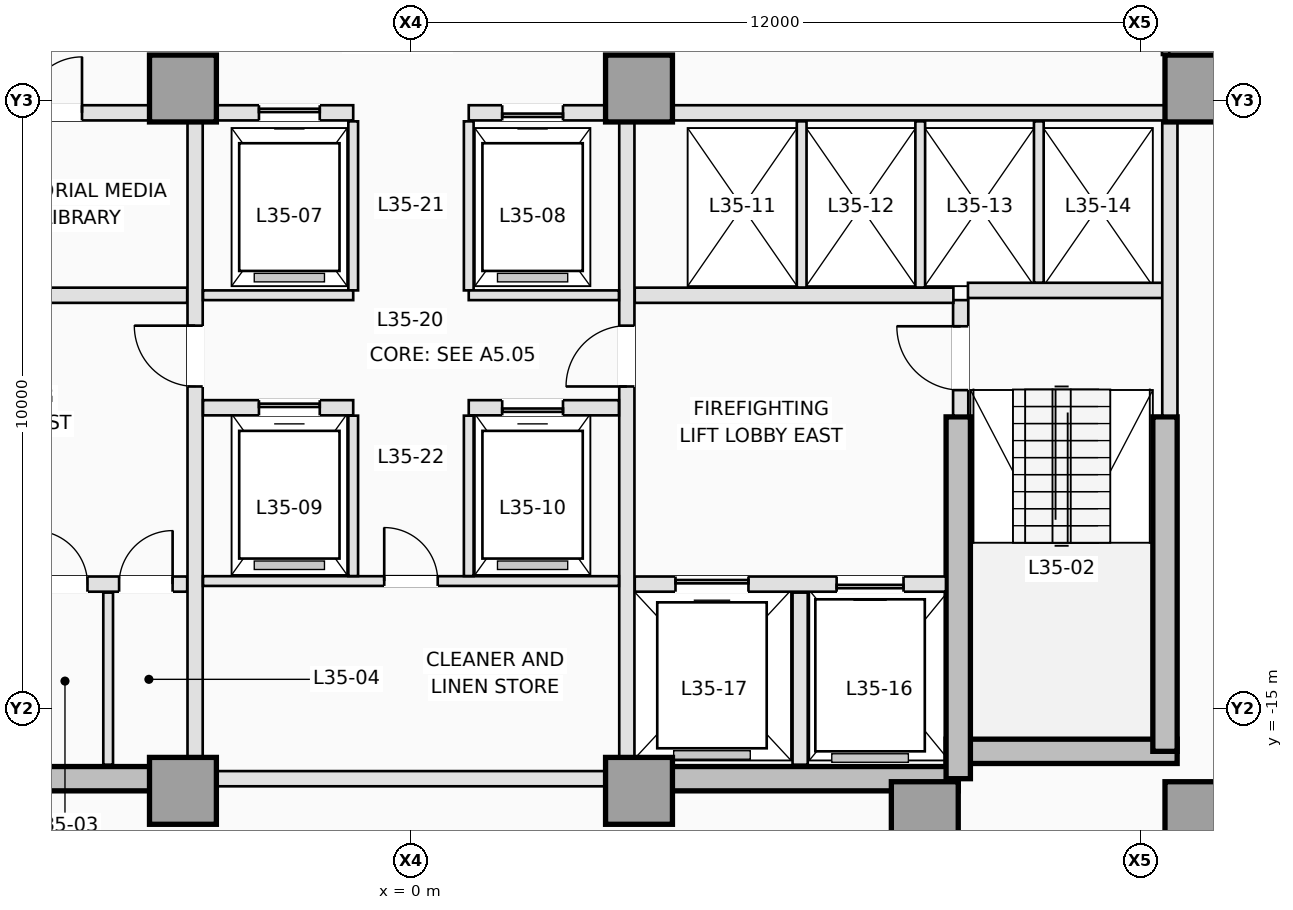
"""IFC4 building model, lengths in metres.
Left out: names, types, materials, properties, quantities, classifications, styles, units other than length and angle.
Written with IfcOpenShell. Run it as: python <this file> out.ifc"""

import sys

from ifc_helpers import new_model, si_unit, direction, frame, frame_2d, origin, origin_2d, place, context, subcontext, project, spatial, rectangle, extrude, element, fill, save


model = new_model("IFC4")
c1 = context("Model", 3, precision=1e-05, world=origin(), true_north=direction((0.0, 1.0)))
c2 = subcontext(c1, "Body", "Model", "MODEL_VIEW")
j1 = project(units=[si_unit("LENGTHUNIT", "METRE"), si_unit("PLANEANGLEUNIT", "RADIAN")], contexts=[c1])
p1 = place(None, origin())
s1 = spatial("IfcSite", under=j1, at=p1, CompositionType="ELEMENT")
p2 = place(p1, origin())
s2 = spatial("IfcBuilding", under=s1, at=p2, CompositionType="ELEMENT")
p3 = place(p2, frame((0.0, 0.0, 130.0)))
s3 = spatial("IfcBuildingStorey", under=s2, at=p3, CompositionType="ELEMENT", Elevation=130.0)
for number, where, z_axis, x_axis in (
    (1, (-9.0, -16.15, 0.0), (0.0, 0.0, 1.0), (1.0, 0.0, 0.0)),
    (2, (3.75, -16.15, 0.0), (0.0, 0.0, 1.0), (1.0, 0.0, 0.0)),
):
    element("IfcWall", number, at=place(p3, frame(where, z_axis=z_axis, x_axis=x_axis)), inside=s3, PredefinedType="SHEAR", context=c2, shape_type="SweptSolid", body=[
        extrude(rectangle(XDim=5.25, YDim=0.4, at=frame_2d((2.625, 0.0))), origin(), (0.0, 0.0, 1.0), 3.5),
    ])
p4 = place(p3, frame((8.8, -15.7, 0.0), z_axis=(0.0, 0.0, 1.0), x_axis=(1.0, 0.0, 0.0)))
e3 = element("IfcWall", 3, at=p4, inside=s3, PredefinedType="SHEAR", context=c2, shape_type="SweptSolid", body=[
    extrude(rectangle(XDim=3.8, YDim=0.4, at=frame_2d((1.9, 0.0))), origin(), (0.0, 0.0, 1.0), 3.5),
])
p5 = place(p3, frame((12.4, -15.7, 0.0), z_axis=(0.0, 0.0, 1.0), x_axis=(0.0, 1.0, 0.0)))
e4 = element("IfcWall", 4, at=p5, inside=s3, PredefinedType="SHEAR", context=c2, shape_type="SweptSolid", body=[
    extrude(rectangle(XDim=5.5, YDim=0.4, at=frame_2d((2.75, 0.0))), origin(), (0.0, 0.0, 1.0), 3.5),
])
p6 = place(p3, frame((9.0, -16.15, 0.0), z_axis=(0.0, 0.0, 1.0), x_axis=(0.0, 1.0, 0.0)))
e5 = element("IfcWall", 5, at=p6, inside=s3, PredefinedType="SHEAR", context=c2, shape_type="SweptSolid", body=[
    extrude(rectangle(XDim=5.95, YDim=0.4, at=frame_2d((2.975, 0.0))), origin(), (0.0, 0.0, 1.0), 3.5),
])
for number, where, z_axis, x_axis in (
    (6, (-3.75, -16.35, 0.0), (0.0, 0.0, 1.0), (1.0, 0.0, 0.0)),
    (7, (3.75, -16.35, 0.0), (0.0, 0.0, 1.0), (1.0, 0.0, 0.0)),
    (8, (8.45, -16.75, 0.0), (0.0, 0.0, 1.0), (1.0, 0.0, 0.0)),
    (9, (12.95, -16.75, 0.0), (0.0, 0.0, 1.0), (1.0, 0.0, 0.0)),
    (10, (-3.75, -4.8, 0.0), (0.0, 0.0, 1.0), (1.0, 0.0, 0.0)),
    (11, (3.75, -4.8, 0.0), (0.0, 0.0, 1.0), (1.0, 0.0, 0.0)),
    (12, (12.95, -4.8, 0.0), (0.0, 0.0, 1.0), (1.0, 0.0, 0.0)),
):
    element("IfcColumn", number, at=place(p3, frame(where, z_axis=z_axis, x_axis=x_axis)), inside=s3, PredefinedType="COLUMN", context=c2, shape_type="SweptSolid", body=[
        extrude(rectangle(XDim=1.1, YDim=1.1, at=origin_2d()), origin(), (0.0, 0.0, 1.0), 3.5),
    ])
p7 = place(p3, frame((9.04, -10.18, 0.0), z_axis=(0.0, 0.0, 1.0), x_axis=(0.0, 1.0, 0.0)))
e13 = element("IfcWall", 13, at=p7, inside=s3, PredefinedType="PARTITIONING", context=c2, shape_type="SweptSolid", body=[
    extrude(rectangle(XDim=1.9, YDim=0.25, at=frame_2d((0.95, 0.0))), origin(), (0.0, 0.0, 1.0), 3.25),
])
p8 = place(p7, frame((0.42, 0.0, 0.0)))
e14 = element("IfcOpeningElement", 14, at=p8, cuts=e13, PredefinedType="OPENING", context=c2, shape_type="SweptSolid", body=[
    extrude(rectangle(XDim=1.05, YDim=2.15, at=frame_2d((0.525, 1.075))), frame((0.0, 0.135, 0.0), z_axis=(0.0, -1.0, 0.0), x_axis=(1.0, 0.0, 0.0)), (0.0, 0.0, 1.0), 0.27),
])
p9 = place(p3, frame((9.16, -8.12, 0.0), z_axis=(0.0, 0.0, 1.0), x_axis=(1.0, 0.0, 0.0)))
e15 = element("IfcWall", 15, at=p9, inside=s3, PredefinedType="PARTITIONING", context=c2, shape_type="SweptSolid", body=[
    extrude(rectangle(XDim=3.22, YDim=0.25, at=frame_2d((1.61, 0.0))), origin(), (0.0, 0.0, 1.0), 3.25),
])
p10 = place(p3, frame((12.48, -10.18, 0.0), z_axis=(0.0, 0.0, 1.0), x_axis=(0.0, 1.0, 0.0)))
e16 = element("IfcWall", 16, at=p10, inside=s3, PredefinedType="PARTITIONING", context=c2, shape_type="SweptSolid", body=[
    extrude(rectangle(XDim=4.828, YDim=0.25, at=frame_2d((2.414, 0.0))), origin(), (0.0, 0.0, 1.0), 3.25),
])
p11 = place(p3, frame((-8.798, -12.95, 0.0), z_axis=(0.0, 0.0, 1.0), x_axis=(1.0, 0.0, 0.0)))
e17 = element("IfcWall", 17, at=p11, inside=s3, PredefinedType="PARTITIONING", context=c2, shape_type="SweptSolid", body=[
    extrude(rectangle(XDim=5.118, YDim=0.25, at=frame_2d((2.559, 0.0))), origin(), (0.0, 0.0, 1.0), 3.25),
])
p12 = place(p11, frame((0.698, 0.0, 0.0)))
e18 = element("IfcOpeningElement", 18, at=p12, cuts=e17, PredefinedType="OPENING", context=c2, shape_type="SweptSolid", body=[
    extrude(rectangle(XDim=1.1, YDim=2.15, at=frame_2d((0.55, 1.075))), frame((0.0, 0.135, 0.0), z_axis=(0.0, -1.0, 0.0), x_axis=(1.0, 0.0, 0.0)), (0.0, 0.0, 1.0), 0.27),
])
p13 = place(p11, frame((2.598, 0.0, 0.0)))
e19 = element("IfcOpeningElement", 19, at=p13, cuts=e17, PredefinedType="OPENING", context=c2, shape_type="SweptSolid", body=[
    extrude(rectangle(XDim=0.88, YDim=2.1, at=frame_2d((0.44, 1.05))), frame((0.0, 0.135, 0.0), z_axis=(0.0, -1.0, 0.0), x_axis=(1.0, 0.0, 0.0)), (0.0, 0.0, 1.0), 0.27),
])
p14 = place(p11, frame((3.998, 0.0, 0.0)))
e20 = element("IfcOpeningElement", 20, at=p14, cuts=e17, PredefinedType="OPENING", context=c2, shape_type="SweptSolid", body=[
    extrude(rectangle(XDim=0.88, YDim=2.1, at=frame_2d((0.44, 1.05))), frame((0.0, 0.135, 0.0), z_axis=(0.0, -1.0, 0.0), x_axis=(1.0, 0.0, 0.0)), (0.0, 0.0, 1.0), 0.27),
])
p15 = place(p3, frame((3.68, -12.95, 0.0), z_axis=(0.0, 0.0, 1.0), x_axis=(1.0, 0.0, 0.0)))
e21 = element("IfcWall", 21, at=p15, inside=s3, PredefinedType="PARTITIONING", context=c2, shape_type="SweptSolid", body=[
    extrude(rectangle(XDim=5.118, YDim=0.25, at=frame_2d((2.559, 0.0))), origin(), (0.0, 0.0, 1.0), 3.25),
])
p16 = place(p15, frame((3.32, 0.0, 0.0)))
e22 = element("IfcOpeningElement", 22, at=p16, cuts=e21, PredefinedType="OPENING", context=c2, shape_type="SweptSolid", body=[
    extrude(rectangle(XDim=1.1, YDim=2.15, at=frame_2d((0.55, 1.075))), frame((0.0, 0.135, 0.0), z_axis=(0.0, -1.0, 0.0), x_axis=(1.0, 0.0, 0.0)), (0.0, 0.0, 1.0), 0.27),
])
p17 = place(p15, frame((0.67, 0.0, 0.0)))
e23 = element("IfcOpeningElement", 23, at=p17, cuts=e21, PredefinedType="OPENING", context=c2, shape_type="SweptSolid", body=[
    extrude(rectangle(XDim=1.2, YDim=2.15, at=frame_2d((0.6, 1.075))), frame((0.0, 0.135, 0.0), z_axis=(0.0, -1.0, 0.0), x_axis=(1.0, 0.0, 0.0)), (0.0, 0.0, 1.0), 0.27),
])
p18 = place(p3, frame((-4.98, -15.92, 0.0), z_axis=(0.0, 0.0, 1.0), x_axis=(0.0, 1.0, 0.0)))
e24 = element("IfcWall", 24, at=p18, inside=s3, PredefinedType="PARTITIONING", context=c2, shape_type="SweptSolid", body=[
    extrude(rectangle(XDim=2.83, YDim=0.16, at=frame_2d((1.415, 0.0))), origin(), (0.0, 0.0, 1.0), 3.25),
])
p19 = place(p3, frame((6.4, -15.92, 0.0), z_axis=(0.0, 0.0, 1.0), x_axis=(0.0, 1.0, 0.0)))
e25 = element("IfcWall", 25, at=p19, inside=s3, PredefinedType="PARTITIONING", context=c2, shape_type="SweptSolid", body=[
    extrude(rectangle(XDim=2.83, YDim=0.25, at=frame_2d((1.415, 0.0))), origin(), (0.0, 0.0, 1.0), 3.25),
])
for number, where, z_axis, x_axis in (
    (26, (-8.92, -8.2, 0.0), (0.0, 0.0, 1.0), (1.0, 0.0, 0.0)),
    (27, (3.68, -8.2, 0.0), (0.0, 0.0, 1.0), (1.0, 0.0, 0.0)),
):
    element("IfcWall", number, at=place(p3, frame(where, z_axis=z_axis, x_axis=x_axis)), inside=s3, PredefinedType="PARTITIONING", context=c2, shape_type="SweptSolid", body=[
        extrude(rectangle(XDim=5.24, YDim=0.25, at=frame_2d((2.62, 0.0))), origin(), (0.0, 0.0, 1.0), 3.25),
    ])
p20 = place(p3, frame((-3.55, -15.798, 0.0), z_axis=(0.0, 0.0, 1.0), x_axis=(0.0, 1.0, 0.0)))
e28 = element("IfcWall", 28, at=p20, inside=s3, PredefinedType="PARTITIONING", context=c2, shape_type="SweptSolid", body=[
    extrude(rectangle(XDim=10.446, YDim=0.25, at=frame_2d((5.223, 0.0))), origin(), (0.0, 0.0, 1.0), 3.25),
])
p21 = place(p20, frame((6.098, 0.0, 0.0)))
e29 = element("IfcOpeningElement", 29, at=p21, cuts=e28, PredefinedType="OPENING", context=c2, shape_type="SweptSolid", body=[
    extrude(rectangle(XDim=1.0, YDim=2.15, at=frame_2d((0.5, 1.075))), frame((0.0, 0.135, 0.0), z_axis=(0.0, -1.0, 0.0), x_axis=(1.0, 0.0, 0.0)), (0.0, 0.0, 1.0), 0.27),
])
p22 = place(p3, frame((3.55, -15.798, 0.0), z_axis=(0.0, 0.0, 1.0), x_axis=(0.0, 1.0, 0.0)))
e30 = element("IfcWall", 30, at=p22, inside=s3, PredefinedType="PARTITIONING", context=c2, shape_type="SweptSolid", body=[
    extrude(rectangle(XDim=10.446, YDim=0.25, at=frame_2d((5.223, 0.0))), origin(), (0.0, 0.0, 1.0), 3.25),
])
p23 = place(p22, frame((6.098, 0.0, 0.0)))
e31 = element("IfcOpeningElement", 31, at=p23, cuts=e30, PredefinedType="OPENING", context=c2, shape_type="SweptSolid", body=[
    extrude(rectangle(XDim=1.0, YDim=2.15, at=frame_2d((0.5, 1.075))), frame((0.0, 0.135, 0.0), z_axis=(0.0, -1.0, 0.0), x_axis=(1.0, 0.0, 0.0)), (0.0, 0.0, 1.0), 0.27),
])
p24 = place(p3, frame((-12.398, -5.2, 0.0), z_axis=(0.0, 0.0, 1.0), x_axis=(1.0, 0.0, 0.0)))
e32 = element("IfcWall", 32, at=p24, inside=s3, PredefinedType="PARTITIONING", context=c2, shape_type="SweptSolid", body=[
    extrude(rectangle(XDim=8.096, YDim=0.25, at=frame_2d((4.048, 0.0))), origin(), (0.0, 0.0, 1.0), 3.25),
])
p25 = place(p24, frame((2.968, 0.0, 0.0)))
e33 = element("IfcOpeningElement", 33, at=p25, cuts=e32, PredefinedType="OPENING", context=c2, shape_type="SweptSolid", body=[
    extrude(rectangle(XDim=0.92, YDim=2.12, at=frame_2d((0.46, 1.06))), frame((0.0, 0.135, 0.0), z_axis=(0.0, -1.0, 0.0), x_axis=(1.0, 0.0, 0.0)), (0.0, 0.0, 1.0), 0.27),
])
p26 = place(p24, frame((6.068, 0.0, 0.0)))
e34 = element("IfcOpeningElement", 34, at=p26, cuts=e32, PredefinedType="OPENING", context=c2, shape_type="SweptSolid", body=[
    extrude(rectangle(XDim=0.92, YDim=2.12, at=frame_2d((0.46, 1.06))), frame((0.0, 0.135, 0.0), z_axis=(0.0, -1.0, 0.0), x_axis=(1.0, 0.0, 0.0)), (0.0, 0.0, 1.0), 0.27),
])
p27 = place(p3, frame((4.302, -5.2, 0.0), z_axis=(0.0, 0.0, 1.0), x_axis=(1.0, 0.0, 0.0)))
e35 = element("IfcWall", 35, at=p27, inside=s3, PredefinedType="PARTITIONING", context=c2, shape_type="SweptSolid", body=[
    extrude(rectangle(XDim=8.096, YDim=0.25, at=frame_2d((4.048, 0.0))), origin(), (0.0, 0.0, 1.0), 3.25),
])
p28 = place(p3, frame((-3.198, -5.2, 0.0), z_axis=(0.0, 0.0, 1.0), x_axis=(1.0, 0.0, 0.0)))
e36 = element("IfcWall", 36, at=p28, inside=s3, PredefinedType="PARTITIONING", context=c2, shape_type="SweptSolid", body=[
    extrude(rectangle(XDim=2.248, YDim=0.25, at=frame_2d((1.124, 0.0))), origin(), (0.0, 0.0, 1.0), 3.25),
])
p29 = place(p28, frame((0.698, 0.0, 0.0)))
e37 = element("IfcOpeningElement", 37, at=p29, cuts=e36, PredefinedType="OPENING", context=c2, shape_type="SweptSolid", body=[
    extrude(rectangle(XDim=1.0, YDim=2.15, at=frame_2d((0.5, 1.075))), frame((0.0, 0.135, 0.0), z_axis=(0.0, -1.0, 0.0), x_axis=(1.0, 0.0, 0.0)), (0.0, 0.0, 1.0), 0.27),
])
p30 = place(p3, frame((0.95, -5.2, 0.0), z_axis=(0.0, 0.0, 1.0), x_axis=(1.0, 0.0, 0.0)))
e38 = element("IfcWall", 38, at=p30, inside=s3, PredefinedType="PARTITIONING", context=c2, shape_type="SweptSolid", body=[
    extrude(rectangle(XDim=2.248, YDim=0.25, at=frame_2d((1.124, 0.0))), origin(), (0.0, 0.0, 1.0), 3.25),
])
p31 = place(p30, frame((0.55, 0.0, 0.0)))
e39 = element("IfcOpeningElement", 39, at=p31, cuts=e38, PredefinedType="OPENING", context=c2, shape_type="SweptSolid", body=[
    extrude(rectangle(XDim=1.0, YDim=2.15, at=frame_2d((0.5, 1.075))), frame((0.0, 0.135, 0.0), z_axis=(0.0, -1.0, 0.0), x_axis=(1.0, 0.0, 0.0)), (0.0, 0.0, 1.0), 0.27),
])
for number, where, z_axis, x_axis in (
    (40, (6.425, -8.073, 0.0), (0.0, 0.0, 1.0), (0.0, 1.0, 0.0)),
    (41, (8.375, -8.073, 0.0), (0.0, 0.0, 1.0), (0.0, 1.0, 0.0)),
):
    element("IfcWall", number, at=place(p3, frame(where, z_axis=z_axis, x_axis=x_axis)), inside=s3, PredefinedType="PARTITIONING", context=c2, shape_type="SweptSolid", body=[
        extrude(rectangle(XDim=2.733, YDim=0.16, at=frame_2d((1.366, 0.0))), origin(), (0.0, 0.0, 1.0), 3.25),
    ])
p32 = place(p3, frame((10.325, -7.993, 0.0), z_axis=(0.0, 0.0, 1.0), x_axis=(0.0, 1.0, 0.0)))
e42 = element("IfcWall", 42, at=p32, inside=s3, PredefinedType="PARTITIONING", context=c2, shape_type="SweptSolid", body=[
    extrude(rectangle(XDim=2.653, YDim=0.16, at=frame_2d((1.326, 0.0))), origin(), (0.0, 0.0, 1.0), 3.25),
])
p33 = place(p3, frame((-3.198, -16.15, 0.0), z_axis=(0.0, 0.0, 1.0), x_axis=(1.0, 0.0, 0.0)))
e43 = element("IfcWall", 43, at=p33, inside=s3, PredefinedType="PARTITIONING", context=c2, shape_type="SweptSolid", body=[
    extrude(rectangle(XDim=6.396, YDim=0.25, at=frame_2d((3.198, 0.0))), origin(), (0.0, 0.0, 1.0), 2.45),
])
for number, where, z_axis, x_axis in (
    (44, (-0.95, -8.12, 0.0), (0.0, 0.0, 1.0), (0.0, 1.0, 0.0)),
    (45, (0.95, -8.12, 0.0), (0.0, 0.0, 1.0), (0.0, 1.0, 0.0)),
):
    element("IfcWall", number, at=place(p3, frame(where, z_axis=z_axis, x_axis=x_axis)), inside=s3, PredefinedType="PARTITIONING", context=c2, shape_type="SweptSolid", body=[
        extrude(rectangle(XDim=2.78, YDim=0.16, at=frame_2d((1.39, 0.0))), origin(), (0.0, 0.0, 1.0), 3.25),
    ])
for number, where, z_axis, x_axis in (
    (46, (-3.42, -8.2, 0.0), (0.0, 0.0, 1.0), (1.0, 0.0, 0.0)),
    (47, (0.95, -8.2, 0.0), (0.0, 0.0, 1.0), (1.0, 0.0, 0.0)),
):
    element("IfcWall", number, at=place(p3, frame(where, z_axis=z_axis, x_axis=x_axis)), inside=s3, PredefinedType="PARTITIONING", context=c2, shape_type="SweptSolid", body=[
        extrude(rectangle(XDim=2.47, YDim=0.16, at=frame_2d((1.235, 0.0))), origin(), (0.0, 0.0, 1.0), 3.25),
    ])
p34 = place(p3, frame((-3.42, -10.05, 0.0), z_axis=(0.0, 0.0, 1.0), x_axis=(1.0, 0.0, 0.0)))
e48 = element("IfcWall", 48, at=p34, inside=s3, PredefinedType="PARTITIONING", context=c2, shape_type="SweptSolid", body=[
    extrude(rectangle(XDim=2.47, YDim=0.25, at=frame_2d((1.235, 0.0))), origin(), (0.0, 0.0, 1.0), 3.25),
])
p35 = place(p34, frame((0.92, 0.0, 0.0)))
e49 = element("IfcOpeningElement", 49, at=p35, cuts=e48, PredefinedType="OPENING", context=c2, shape_type="SweptSolid", body=[
    extrude(rectangle(XDim=1.0, YDim=2.15, at=frame_2d((0.5, 1.075))), frame((0.0, 0.135, 0.0), z_axis=(0.0, -1.0, 0.0), x_axis=(1.0, 0.0, 0.0)), (0.0, 0.0, 1.0), 0.27),
])
p36 = place(p3, frame((0.95, -10.05, 0.0), z_axis=(0.0, 0.0, 1.0), x_axis=(1.0, 0.0, 0.0)))
e50 = element("IfcWall", 50, at=p36, inside=s3, PredefinedType="PARTITIONING", context=c2, shape_type="SweptSolid", body=[
    extrude(rectangle(XDim=2.47, YDim=0.25, at=frame_2d((1.235, 0.0))), origin(), (0.0, 0.0, 1.0), 3.25),
])
p37 = place(p36, frame((0.55, 0.0, 0.0)))
e51 = element("IfcOpeningElement", 51, at=p37, cuts=e50, PredefinedType="OPENING", context=c2, shape_type="SweptSolid", body=[
    extrude(rectangle(XDim=1.0, YDim=2.15, at=frame_2d((0.5, 1.075))), frame((0.0, 0.135, 0.0), z_axis=(0.0, -1.0, 0.0), x_axis=(1.0, 0.0, 0.0)), (0.0, 0.0, 1.0), 0.27),
])
p38 = place(p3, frame((-3.42, -12.9, 0.0), z_axis=(0.0, 0.0, 1.0), x_axis=(1.0, 0.0, 0.0)))
e52 = element("IfcWall", 52, at=p38, inside=s3, PredefinedType="PARTITIONING", context=c2, shape_type="SweptSolid", body=[
    extrude(rectangle(XDim=6.84, YDim=0.16, at=frame_2d((3.42, 0.0))), origin(), (0.0, 0.0, 1.0), 3.25),
])
p39 = place(p38, frame((2.98, 0.0, 0.0)))
e53 = element("IfcOpeningElement", 53, at=p39, cuts=e52, PredefinedType="OPENING", context=c2, shape_type="SweptSolid", body=[
    extrude(rectangle(XDim=0.88, YDim=2.12, at=frame_2d((0.44, 1.06))), frame((0.0, 0.09, 0.0), z_axis=(0.0, -1.0, 0.0), x_axis=(1.0, 0.0, 0.0)), (0.0, 0.0, 1.0), 0.18),
])
for number, where, z_axis, x_axis in (
    (54, (-0.95, -12.818, 0.0), (0.0, 0.0, 1.0), (0.0, 1.0, 0.0)),
    (55, (0.95, -12.818, 0.0), (0.0, 0.0, 1.0), (0.0, 1.0, 0.0)),
):
    element("IfcWall", number, at=place(p3, frame(where, z_axis=z_axis, x_axis=x_axis)), inside=s3, PredefinedType="PARTITIONING", context=c2, shape_type="SweptSolid", body=[
        extrude(rectangle(XDim=2.638, YDim=0.16, at=frame_2d((1.319, 0.0))), origin(), (0.0, 0.0, 1.0), 3.25),
    ])
p40 = place(p3, frame((12.41, -2.462, 0.0), z_axis=(0.0, 0.0, 1.0), x_axis=(0.0, -1.0, 0.0)))
e56 = element("IfcWall", 56, at=p40, inside=s3, PredefinedType="PARTITIONING", context=c2, shape_type="SweptSolid", body=[
    extrude(rectangle(XDim=1.786, YDim=0.12, at=frame_2d((0.893, 0.0))), origin(), (0.0, 0.0, 1.0), 3.25),
])
p41 = place(p29, origin())
e57 = element("IfcDoor", 57, at=p41, inside=s3, OperationType="SLIDING_TO_LEFT", PredefinedType="DOOR", context=c2, shape_type="SweptSolid", body=[
    extrude(rectangle(XDim=1.0, YDim=2.15, at=frame_2d((0.5, 1.075))), frame((0.0, 0.025, 0.0), z_axis=(0.0, -1.0, 0.0), x_axis=(1.0, 0.0, 0.0)), (0.0, 0.0, 1.0), 0.05),
])
fill(e37, e57)
p42 = place(p31, origin())
e58 = element("IfcDoor", 58, at=p42, inside=s3, OperationType="SLIDING_TO_RIGHT", PredefinedType="DOOR", context=c2, shape_type="SweptSolid", body=[
    extrude(rectangle(XDim=1.0, YDim=2.15, at=frame_2d((0.5, 1.075))), frame((0.0, 0.025, 0.0), z_axis=(0.0, -1.0, 0.0), x_axis=(1.0, 0.0, 0.0)), (0.0, 0.0, 1.0), 0.05),
])
fill(e39, e58)
p43 = place(p16, origin())
e59 = element("IfcDoor", 59, at=p43, inside=s3, OperationType="SLIDING_TO_RIGHT", PredefinedType="DOOR", context=c2, shape_type="SweptSolid", body=[
    extrude(rectangle(XDim=1.1, YDim=2.15, at=frame_2d((0.55, 1.075))), frame((0.0, 0.025, 0.0), z_axis=(0.0, -1.0, 0.0), x_axis=(1.0, 0.0, 0.0)), (0.0, 0.0, 1.0), 0.05),
])
fill(e22, e59)
p44 = place(p17, origin())
e60 = element("IfcDoor", 60, at=p44, inside=s3, OperationType="SLIDING_TO_LEFT", PredefinedType="DOOR", context=c2, shape_type="SweptSolid", body=[
    extrude(rectangle(XDim=1.2, YDim=2.15, at=frame_2d((0.6, 1.075))), frame((0.0, 0.025, 0.0), z_axis=(0.0, -1.0, 0.0), x_axis=(1.0, 0.0, 0.0)), (0.0, 0.0, 1.0), 0.05),
])
fill(e23, e60)
p45 = place(p35, origin())
e61 = element("IfcDoor", 61, at=p45, inside=s3, OperationType="SLIDING_TO_LEFT", PredefinedType="DOOR", context=c2, shape_type="SweptSolid", body=[
    extrude(rectangle(XDim=1.0, YDim=2.15, at=frame_2d((0.5, 1.075))), frame((0.0, 0.025, 0.0), z_axis=(0.0, -1.0, 0.0), x_axis=(1.0, 0.0, 0.0)), (0.0, 0.0, 1.0), 0.05),
])
fill(e49, e61)
p46 = place(p37, origin())
e62 = element("IfcDoor", 62, at=p46, inside=s3, OperationType="SLIDING_TO_RIGHT", PredefinedType="DOOR", context=c2, shape_type="SweptSolid", body=[
    extrude(rectangle(XDim=1.0, YDim=2.15, at=frame_2d((0.5, 1.075))), frame((0.0, 0.025, 0.0), z_axis=(0.0, -1.0, 0.0), x_axis=(1.0, 0.0, 0.0)), (0.0, 0.0, 1.0), 0.05),
])
fill(e51, e62)
p47 = place(p8, origin())
e63 = element("IfcDoor", 63, at=p47, inside=s3, OperationType="SINGLE_SWING_RIGHT", PredefinedType="DOOR", context=c2, shape_type="SweptSolid", body=[
    extrude(rectangle(XDim=1.05, YDim=2.15, at=frame_2d((0.525, 1.075))), frame((0.0, 0.025, 0.0), z_axis=(0.0, -1.0, 0.0), x_axis=(1.0, 0.0, 0.0)), (0.0, 0.0, 1.0), 0.05),
])
fill(e14, e63)
p48 = place(p13, origin())
e64 = element("IfcDoor", 64, at=p48, inside=s3, OperationType="SINGLE_SWING_LEFT", PredefinedType="TRAPDOOR", context=c2, shape_type="SweptSolid", body=[
    extrude(rectangle(XDim=0.88, YDim=2.1, at=frame_2d((0.44, 1.05))), frame((0.0, 0.025, 0.0), z_axis=(0.0, -1.0, 0.0), x_axis=(1.0, 0.0, 0.0)), (0.0, 0.0, 1.0), 0.05),
])
fill(e19, e64)
p49 = place(p14, origin())
e65 = element("IfcDoor", 65, at=p49, inside=s3, OperationType="SINGLE_SWING_RIGHT", PredefinedType="TRAPDOOR", context=c2, shape_type="SweptSolid", body=[
    extrude(rectangle(XDim=0.88, YDim=2.1, at=frame_2d((0.44, 1.05))), frame((0.0, 0.025, 0.0), z_axis=(0.0, -1.0, 0.0), x_axis=(1.0, 0.0, 0.0)), (0.0, 0.0, 1.0), 0.05),
])
fill(e20, e65)
p50 = place(p21, origin())
e66 = element("IfcDoor", 66, at=p50, inside=s3, OperationType="SINGLE_SWING_RIGHT", PredefinedType="DOOR", context=c2, shape_type="SweptSolid", body=[
    extrude(rectangle(XDim=1.0, YDim=2.15, at=frame_2d((0.5, 1.075))), frame((0.0, 0.025, 0.0), z_axis=(0.0, -1.0, 0.0), x_axis=(1.0, 0.0, 0.0)), (0.0, 0.0, 1.0), 0.05),
])
fill(e29, e66)
p51 = place(p23, origin())
e67 = element("IfcDoor", 67, at=p51, inside=s3, OperationType="SINGLE_SWING_LEFT", PredefinedType="DOOR", context=c2, shape_type="SweptSolid", body=[
    extrude(rectangle(XDim=1.0, YDim=2.15, at=frame_2d((0.5, 1.075))), frame((0.0, 0.025, 0.0), z_axis=(0.0, -1.0, 0.0), x_axis=(1.0, 0.0, 0.0)), (0.0, 0.0, 1.0), 0.05),
])
fill(e31, e67)
p52 = place(p26, origin())
e68 = element("IfcDoor", 68, at=p52, inside=s3, OperationType="SINGLE_SWING_RIGHT", PredefinedType="DOOR", context=c2, shape_type="SweptSolid", body=[
    extrude(rectangle(XDim=0.92, YDim=2.12, at=frame_2d((0.46, 1.06))), frame((0.0, 0.025, 0.0), z_axis=(0.0, -1.0, 0.0), x_axis=(1.0, 0.0, 0.0)), (0.0, 0.0, 1.0), 0.05),
])
fill(e34, e68)
p53 = place(p39, origin())
e69 = element("IfcDoor", 69, at=p53, inside=s3, OperationType="SINGLE_SWING_LEFT", PredefinedType="DOOR", context=c2, shape_type="SweptSolid", body=[
    extrude(rectangle(XDim=0.88, YDim=2.12, at=frame_2d((0.44, 1.06))), frame((0.0, 0.025, 0.0), z_axis=(0.0, -1.0, 0.0), x_axis=(1.0, 0.0, 0.0)), (0.0, 0.0, 1.0), 0.05),
])
fill(e53, e69)
save(model, sys.argv[1])
